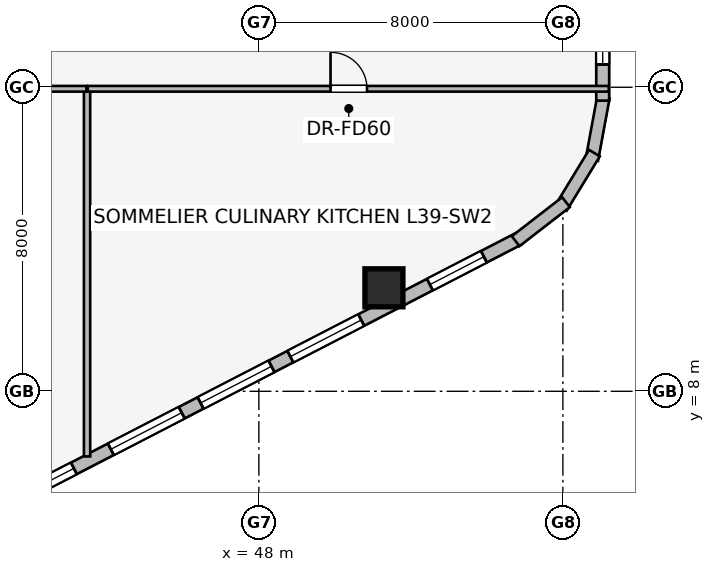
"""IFC4 building model, lengths in metres.
Left out: names, types, materials, properties, quantities, classifications, styles, units other than length and angle.
Written with IfcOpenShell. Run it as: python <this file> out.ifc"""

import sys

from ifc_helpers import new_model, si_unit, direction, frame, frame_2d, origin, origin_2d, place, context, subcontext, project, spatial, rectangle, extrude, element, fill, save


model = new_model("IFC4")
c1 = context("Model", 3, precision=1e-05, world=origin(), true_north=direction((0.0, 1.0)))
c2 = subcontext(c1, "Body", "Model", "MODEL_VIEW")
j1 = project(units=[si_unit("LENGTHUNIT", "METRE"), si_unit("PLANEANGLEUNIT", "RADIAN")], contexts=[c1])
p1 = place(None, origin())
s1 = spatial("IfcSite", under=j1, at=p1, CompositionType="ELEMENT")
p2 = place(p1, origin())
s2 = spatial("IfcBuilding", under=s1, at=p2, CompositionType="ELEMENT")
p3 = place(p2, frame((0.0, 0.0, 146.4)))
s3 = spatial("IfcBuildingStorey", under=s2, at=p3, CompositionType="ELEMENT", Elevation=146.4)
p4 = place(p3, frame((51.291, 10.723, 0.0), z_axis=(0.0, 0.0, 1.0), x_axis=(1.0, 0.0, 0.0)))
e1 = element("IfcColumn", 1, at=p4, inside=s3, PredefinedType="COLUMN", context=c2, shape_type="SweptSolid", body=[
    extrude(rectangle(XDim=1.0, YDim=1.0, at=origin_2d()), origin(), (0.0, 0.0, 1.0), 3.45),
])
p5 = place(p3, frame((54.831, 12.01, 0.0), z_axis=(0.0, 0.0, 1.0), x_axis=(-0.888613612362, -0.458656568606, 0.0)))
e2 = element("IfcWall", 2, at=p5, inside=s3, PredefinedType="STANDARD", context=c2, shape_type="SweptSolid", body=[
    extrude(rectangle(XDim=18.681, YDim=0.34, at=frame_2d((9.34, 0.0))), origin(), (0.0, 0.0, 1.0), 3.19),
])
p6 = place(p5, frame((1.023, 0.0, 0.75)))
e3 = element("IfcOpeningElement", 3, at=p6, cuts=e2, PredefinedType="OPENING", context=c2, shape_type="SweptSolid", body=[
    extrude(rectangle(XDim=1.6, YDim=1.55, at=frame_2d((0.8, 0.775))), frame((0.0, 0.18, 0.0), z_axis=(0.0, -1.0, 0.0), x_axis=(1.0, 0.0, 0.0)), (0.0, 0.0, 1.0), 0.36),
])
p7 = place(p5, frame((4.655, 0.0, 0.75)))
e4 = element("IfcOpeningElement", 4, at=p7, cuts=e2, PredefinedType="OPENING", context=c2, shape_type="SweptSolid", body=[
    extrude(rectangle(XDim=2.1, YDim=1.5, at=frame_2d((1.05, 0.75))), frame((0.0, 0.18, 0.0), z_axis=(0.0, -1.0, 0.0), x_axis=(1.0, 0.0, 0.0)), (0.0, 0.0, 1.0), 0.36),
])
p8 = place(p5, frame((7.313, 0.0, 0.75)))
e5 = element("IfcOpeningElement", 5, at=p8, cuts=e2, PredefinedType="OPENING", context=c2, shape_type="SweptSolid", body=[
    extrude(rectangle(XDim=2.1, YDim=1.5, at=frame_2d((1.05, 0.75))), frame((0.0, 0.18, 0.0), z_axis=(0.0, -1.0, 0.0), x_axis=(1.0, 0.0, 0.0)), (0.0, 0.0, 1.0), 0.36),
])
p9 = place(p5, frame((9.971, 0.0, 0.75)))
e6 = element("IfcOpeningElement", 6, at=p9, cuts=e2, PredefinedType="OPENING", context=c2, shape_type="SweptSolid", body=[
    extrude(rectangle(XDim=2.1, YDim=1.5, at=frame_2d((1.05, 0.75))), frame((0.0, 0.18, 0.0), z_axis=(0.0, -1.0, 0.0), x_axis=(1.0, 0.0, 0.0)), (0.0, 0.0, 1.0), 0.36),
])
p10 = place(p5, frame((13.165, 0.0, 0.75)))
e7 = element("IfcOpeningElement", 7, at=p10, cuts=e2, PredefinedType="OPENING", context=c2, shape_type="SweptSolid", body=[
    extrude(rectangle(XDim=1.05, YDim=1.4, at=frame_2d((0.525, 0.7))), frame((0.0, 0.18, 0.0), z_axis=(0.0, -1.0, 0.0), x_axis=(1.0, 0.0, 0.0)), (0.0, 0.0, 1.0), 0.36),
])
p11 = place(p5, frame((15.808, 0.0, 0.75)))
e8 = element("IfcOpeningElement", 8, at=p11, cuts=e2, PredefinedType="OPENING", context=c2, shape_type="SweptSolid", body=[
    extrude(rectangle(XDim=2.1, YDim=1.5, at=frame_2d((1.05, 0.75))), frame((0.0, 0.18, 0.0), z_axis=(0.0, -1.0, 0.0), x_axis=(1.0, 0.0, 0.0)), (0.0, 0.0, 1.0), 0.36),
])
p12 = place(p3, frame((57.068, 15.742, 0.0), z_axis=(0.0, 0.0, 1.0), x_axis=(-0.181984991895, -0.983301308209, 0.0)))
e9 = element("IfcWall", 9, at=p12, inside=s3, PredefinedType="STANDARD", context=c2, shape_type="SweptSolid", body=[
    extrude(rectangle(XDim=1.677, YDim=0.33, at=frame_2d((0.838, 0.0))), origin(), (0.0, 0.0, 1.0), 3.19),
])
p13 = place(p3, frame((56.83, 14.268, 0.0), z_axis=(0.0, 0.0, 1.0), x_axis=(-0.520519429557, -0.853849824883, 0.0)))
e10 = element("IfcWall", 10, at=p13, inside=s3, PredefinedType="STANDARD", context=c2, shape_type="SweptSolid", body=[
    extrude(rectangle(XDim=1.677, YDim=0.33, at=frame_2d((0.839, 0.0))), origin(), (0.0, 0.0, 1.0), 3.19),
])
p14 = place(p3, frame((56.082, 12.976, 0.0), z_axis=(0.0, 0.0, 1.0), x_axis=(-0.790621329885, -0.612305408053, 0.0)))
e11 = element("IfcWall", 11, at=p14, inside=s3, PredefinedType="STANDARD", context=c2, shape_type="SweptSolid", body=[
    extrude(rectangle(XDim=1.676, YDim=0.33, at=frame_2d((0.838, 0.0))), origin(), (0.0, 0.0, 1.0), 3.19),
])
p15 = place(p3, frame((57.048, 32.352, 0.0), z_axis=(0.0, 0.0, 1.0), x_axis=(0.0, -1.0, 0.0)))
e12 = element("IfcWall", 12, at=p15, inside=s3, PredefinedType="STANDARD", context=c2, shape_type="SweptSolid", body=[
    extrude(rectangle(XDim=16.704, YDim=0.34, at=frame_2d((8.352, 0.0))), origin(), (0.0, 0.0, 1.0), 3.19),
])
p16 = place(p15, frame((0.992, 0.0, 0.75)))
e13 = element("IfcOpeningElement", 13, at=p16, cuts=e12, PredefinedType="OPENING", context=c2, shape_type="SweptSolid", body=[
    extrude(rectangle(XDim=1.05, YDim=1.4, at=frame_2d((0.525, 0.7))), frame((0.0, 0.18, 0.0), z_axis=(0.0, -1.0, 0.0), x_axis=(1.0, 0.0, 0.0)), (0.0, 0.0, 1.0), 0.36),
])
p17 = place(p15, frame((4.935, 0.0, 0.75)))
e14 = element("IfcOpeningElement", 14, at=p17, cuts=e12, PredefinedType="OPENING", context=c2, shape_type="SweptSolid", body=[
    extrude(rectangle(XDim=2.1, YDim=1.5, at=frame_2d((1.05, 0.75))), frame((0.0, 0.18, 0.0), z_axis=(0.0, -1.0, 0.0), x_axis=(1.0, 0.0, 0.0)), (0.0, 0.0, 1.0), 0.36),
])
p18 = place(p15, frame((9.919, 0.0, 0.75)))
e15 = element("IfcOpeningElement", 15, at=p18, cuts=e12, PredefinedType="OPENING", context=c2, shape_type="SweptSolid", body=[
    extrude(rectangle(XDim=1.6, YDim=1.55, at=frame_2d((0.8, 0.775))), frame((0.0, 0.18, 0.0), z_axis=(0.0, -1.0, 0.0), x_axis=(1.0, 0.0, 0.0)), (0.0, 0.0, 1.0), 0.36),
])
p19 = place(p15, frame((14.702, 0.0, 0.75)))
e16 = element("IfcOpeningElement", 16, at=p19, cuts=e12, PredefinedType="OPENING", context=c2, shape_type="SweptSolid", body=[
    extrude(rectangle(XDim=1.05, YDim=1.4, at=frame_2d((0.525, 0.7))), frame((0.0, 0.18, 0.0), z_axis=(0.0, -1.0, 0.0), x_axis=(1.0, 0.0, 0.0)), (0.0, 0.0, 1.0), 0.36),
])
p20 = place(p3, frame((43.479, 6.286, 0.0), z_axis=(0.0, 0.0, 1.0), x_axis=(0.0, 1.0, 0.0)))
e17 = element("IfcWall", 17, at=p20, inside=s3, PredefinedType="PARTITIONING", context=c2, shape_type="SweptSolid", body=[
    extrude(rectangle(XDim=9.644, YDim=0.165, at=frame_2d((4.822, 0.0))), origin(), (0.0, 0.0, 1.0), 3.19),
])
p21 = place(p3, frame((32.85, 15.96, 0.0), z_axis=(0.0, 0.0, 1.0), x_axis=(1.0, 0.0, 0.0)))
e18 = element("IfcWall", 18, at=p21, inside=s3, PredefinedType="PARTITIONING", context=c2, shape_type="SweptSolid", body=[
    extrude(rectangle(XDim=10.611, YDim=0.15, at=frame_2d((5.305, 0.0))), origin(), (0.0, 0.0, 1.0), 3.19),
])
p22 = place(p21, frame((4.826, 0.0, 0.0)))
e19 = element("IfcOpeningElement", 19, at=p22, cuts=e18, PredefinedType="OPENING", context=c2, shape_type="SweptSolid", body=[
    extrude(rectangle(XDim=0.96, YDim=2.0, at=frame_2d((0.48, 1.0))), frame((0.0, 0.085, 0.0), z_axis=(0.0, -1.0, 0.0), x_axis=(1.0, 0.0, 0.0)), (0.0, 0.0, 1.0), 0.17),
])
p23 = place(p3, frame((43.497, 15.96, 0.0), z_axis=(0.0, 0.0, 1.0), x_axis=(1.0, 0.0, 0.0)))
e20 = element("IfcWall", 20, at=p23, inside=s3, PredefinedType="PARTITIONING", context=c2, shape_type="SweptSolid", body=[
    extrude(rectangle(XDim=13.711, YDim=0.15, at=frame_2d((6.855, 0.0))), origin(), (0.0, 0.0, 1.0), 3.19),
])
p24 = place(p23, frame((6.389, 0.0, 0.0)))
e21 = element("IfcOpeningElement", 21, at=p24, cuts=e20, PredefinedType="OPENING", context=c2, shape_type="SweptSolid", body=[
    extrude(rectangle(XDim=0.96, YDim=2.0, at=frame_2d((0.48, 1.0))), frame((0.0, 0.085, 0.0), z_axis=(0.0, -1.0, 0.0), x_axis=(1.0, 0.0, 0.0)), (0.0, 0.0, 1.0), 0.17),
])
p25 = place(p6, origin())
e22 = element("IfcWindow", 22, at=p25, inside=s3, PartitioningType="SINGLE_PANEL", PredefinedType="WINDOW", context=c2, shape_type="SweptSolid", body=[
    extrude(rectangle(XDim=1.6, YDim=1.55, at=frame_2d((0.8, 0.775))), frame((0.0, 0.03, 0.0), z_axis=(0.0, -1.0, 0.0), x_axis=(1.0, 0.0, 0.0)), (0.0, 0.0, 1.0), 0.06),
])
fill(e3, e22)
p26 = place(p7, origin())
e23 = element("IfcWindow", 23, at=p26, inside=s3, PartitioningType="SINGLE_PANEL", PredefinedType="WINDOW", context=c2, shape_type="SweptSolid", body=[
    extrude(rectangle(XDim=2.1, YDim=1.5, at=frame_2d((1.05, 0.75))), frame((0.0, 0.03, 0.0), z_axis=(0.0, -1.0, 0.0), x_axis=(1.0, 0.0, 0.0)), (0.0, 0.0, 1.0), 0.06),
])
fill(e4, e23)
p27 = place(p8, origin())
e24 = element("IfcWindow", 24, at=p27, inside=s3, PartitioningType="SINGLE_PANEL", PredefinedType="WINDOW", context=c2, shape_type="SweptSolid", body=[
    extrude(rectangle(XDim=2.1, YDim=1.5, at=frame_2d((1.05, 0.75))), frame((0.0, 0.03, 0.0), z_axis=(0.0, -1.0, 0.0), x_axis=(1.0, 0.0, 0.0)), (0.0, 0.0, 1.0), 0.06),
])
fill(e5, e24)
p28 = place(p9, origin())
e25 = element("IfcWindow", 25, at=p28, inside=s3, PartitioningType="SINGLE_PANEL", PredefinedType="WINDOW", context=c2, shape_type="SweptSolid", body=[
    extrude(rectangle(XDim=2.1, YDim=1.5, at=frame_2d((1.05, 0.75))), frame((0.0, 0.03, 0.0), z_axis=(0.0, -1.0, 0.0), x_axis=(1.0, 0.0, 0.0)), (0.0, 0.0, 1.0), 0.06),
])
fill(e6, e25)
p29 = place(p10, origin())
e26 = element("IfcWindow", 26, at=p29, inside=s3, PartitioningType="SINGLE_PANEL", PredefinedType="WINDOW", context=c2, shape_type="SweptSolid", body=[
    extrude(rectangle(XDim=1.05, YDim=1.4, at=frame_2d((0.525, 0.7))), frame((0.0, 0.03, 0.0), z_axis=(0.0, -1.0, 0.0), x_axis=(1.0, 0.0, 0.0)), (0.0, 0.0, 1.0), 0.06),
])
fill(e7, e26)
p30 = place(p19, origin())
e27 = element("IfcWindow", 27, at=p30, inside=s3, PartitioningType="SINGLE_PANEL", PredefinedType="WINDOW", context=c2, shape_type="SweptSolid", body=[
    extrude(rectangle(XDim=1.05, YDim=1.4, at=frame_2d((0.525, 0.7))), frame((0.0, 0.03, 0.0), z_axis=(0.0, -1.0, 0.0), x_axis=(1.0, 0.0, 0.0)), (0.0, 0.0, 1.0), 0.06),
])
fill(e16, e27)
p31 = place(p24, origin())
e28 = element("IfcDoor", 28, at=p31, inside=s3, OperationType="SINGLE_SWING_LEFT", PredefinedType="DOOR", context=c2, shape_type="SweptSolid", body=[
    extrude(rectangle(XDim=0.96, YDim=2.0, at=frame_2d((0.48, 1.0))), frame((0.0, 0.025, 0.0), z_axis=(0.0, -1.0, 0.0), x_axis=(1.0, 0.0, 0.0)), (0.0, 0.0, 1.0), 0.05),
])
fill(e21, e28)
save(model, sys.argv[1])
